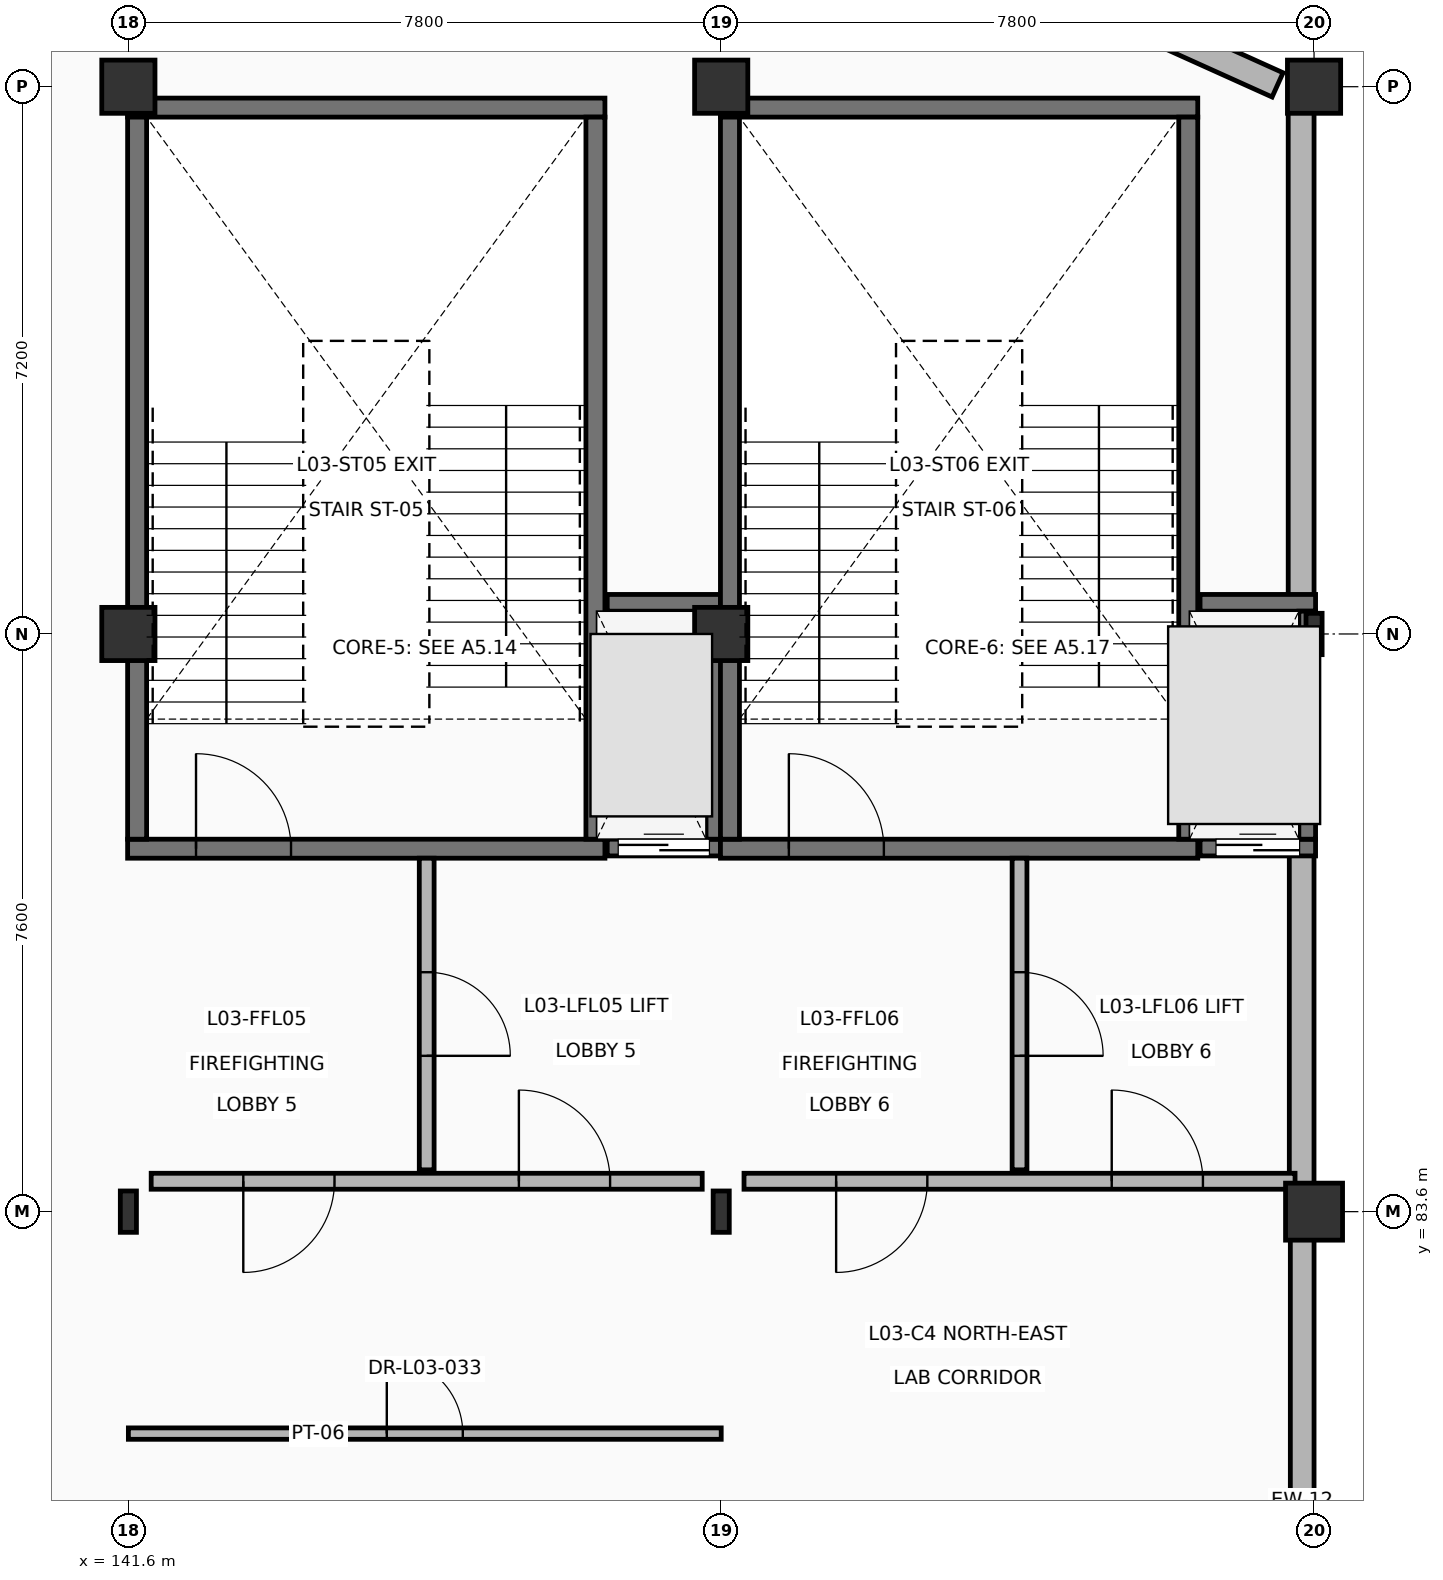
"""IFC4 building model, lengths in metres.
Left out: names, types, materials, properties, quantities, classifications, styles, units other than length and angle.
Written with IfcOpenShell. Run it as: python <this file> out.ifc"""

import sys

from ifc_helpers import new_model, si_unit, direction, frame, frame_2d, origin, origin_2d, place, context, subcontext, project, spatial, rectangle, circle, i_section, extrude, element, fill, save


model = new_model("IFC4")
c1 = context("Model", 3, precision=1e-05, world=origin(), true_north=direction((0.0, 1.0)))
c2 = subcontext(c1, "Body", "Model", "MODEL_VIEW")
j1 = project(units=[si_unit("LENGTHUNIT", "METRE"), si_unit("PLANEANGLEUNIT", "RADIAN")], contexts=[c1])
p1 = place(None, origin())
s1 = spatial("IfcSite", under=j1, at=p1, CompositionType="ELEMENT")
p2 = place(p1, origin())
s2 = spatial("IfcBuilding", under=s1, at=p2, CompositionType="ELEMENT")
p3 = place(p2, frame((0.0, 0.0, 10.5)))
s3 = spatial("IfcBuildingStorey", under=s2, at=p3, CompositionType="ELEMENT", Elevation=10.5)
p4 = place(p3, frame((141.6, 83.6, 0.0), z_axis=(0.0, 0.0, 1.0), x_axis=(1.0, 0.0, 0.0)))
e1 = element("IfcColumn", 1, at=p4, inside=s3, PredefinedType="COLUMN", context=c2, shape_type="SweptSolid", body=[
    extrude(i_section(OverallWidth=0.212, OverallDepth=0.544, WebThickness=0.013, FlangeThickness=0.021, at=origin_2d()), origin(), (0.0, 0.0, 1.0), 4.8),
])
for number, where, z_axis, x_axis in (
    (2, (141.6, 91.2, 0.0), (0.0, 0.0, 1.0), (1.0, 0.0, 0.0)),
    (3, (141.6, 98.4, 0.0), (0.0, 0.0, 1.0), (1.0, 0.0, 0.0)),
):
    element("IfcColumn", number, at=place(p3, frame(where, z_axis=z_axis, x_axis=x_axis)), inside=s3, PredefinedType="COLUMN", context=c2, shape_type="SweptSolid", body=[
        extrude(rectangle(XDim=0.7, YDim=0.7, at=origin_2d()), origin(), (0.0, 0.0, 1.0), 4.8),
    ])
p5 = place(p3, frame((149.4, 83.6, 0.0), z_axis=(0.0, 0.0, 1.0), x_axis=(1.0, 0.0, 0.0)))
e4 = element("IfcColumn", 4, at=p5, inside=s3, PredefinedType="COLUMN", context=c2, shape_type="SweptSolid", body=[
    extrude(i_section(OverallWidth=0.212, OverallDepth=0.544, WebThickness=0.013, FlangeThickness=0.021, at=origin_2d()), origin(), (0.0, 0.0, 1.0), 4.8),
])
for number, where, z_axis, x_axis in (
    (5, (149.4, 91.2, 0.0), (0.0, 0.0, 1.0), (1.0, 0.0, 0.0)),
    (6, (149.4, 98.4, 0.0), (0.0, 0.0, 1.0), (1.0, 0.0, 0.0)),
):
    element("IfcColumn", number, at=place(p3, frame(where, z_axis=z_axis, x_axis=x_axis)), inside=s3, PredefinedType="COLUMN", context=c2, shape_type="SweptSolid", body=[
        extrude(rectangle(XDim=0.7, YDim=0.7, at=origin_2d()), origin(), (0.0, 0.0, 1.0), 4.8),
    ])
p6 = place(p3, frame((157.2, 83.6, 0.0), z_axis=(0.0, 0.0, 1.0), x_axis=(1.0, 0.0, 0.0)))
e7 = element("IfcColumn", 7, at=p6, inside=s3, PredefinedType="COLUMN", context=c2, shape_type="SweptSolid", body=[
    extrude(circle(Radius=0.375, at=origin_2d()), origin(), (0.0, 0.0, 1.0), 4.8),
])
p7 = place(p3, frame((157.2, 91.2, 0.0), z_axis=(0.0, 0.0, 1.0), x_axis=(1.0, 0.0, 0.0)))
e8 = element("IfcColumn", 8, at=p7, inside=s3, PredefinedType="COLUMN", context=c2, shape_type="SweptSolid", body=[
    extrude(i_section(OverallWidth=0.212, OverallDepth=0.544, WebThickness=0.013, FlangeThickness=0.021, at=origin_2d()), origin(), (0.0, 0.0, 1.0), 4.8),
])
p8 = place(p3, frame((157.2, 98.4, 0.0), z_axis=(0.0, 0.0, 1.0), x_axis=(1.0, 0.0, 0.0)))
e9 = element("IfcColumn", 9, at=p8, inside=s3, PredefinedType="COLUMN", context=c2, shape_type="SweptSolid", body=[
    extrude(rectangle(XDim=0.7, YDim=0.7, at=origin_2d()), origin(), (0.0, 0.0, 1.0), 4.8),
])
p9 = place(p3, frame((157.03, 98.065, 0.0), z_axis=(0.0, 0.0, 1.0), x_axis=(0.0, -1.0, 0.0)))
e10 = element("IfcWall", 10, at=p9, inside=s3, PredefinedType="SOLIDWALL", context=c2, shape_type="SweptSolid", body=[
    extrude(rectangle(XDim=6.385, YDim=0.34, at=frame_2d((3.192, 0.0))), origin(), (0.0, 0.0, 1.0), 3.991),
])
p10 = place(p3, frame((157.037, 88.32, 0.0), z_axis=(0.0, 0.0, 1.0), x_axis=(0.0, -1.0, 0.0)))
e11 = element("IfcWall", 11, at=p10, inside=s3, PredefinedType="SOLIDWALL", context=c2, shape_type="SweptSolid", body=[
    extrude(rectangle(XDim=4.36, YDim=0.325, at=frame_2d((2.18, 0.0))), origin(), (0.0, 0.0, 1.0), 3.991),
])
p11 = place(p3, frame((157.044, 83.24, 0.0), z_axis=(0.0, 0.0, 1.0), x_axis=(0.0, -1.0, 0.0)))
e12 = element("IfcWall", 12, at=p11, inside=s3, PredefinedType="SOLIDWALL", context=c2, shape_type="SweptSolid", body=[
    extrude(rectangle(XDim=6.905, YDim=0.312, at=frame_2d((3.453, 0.0))), origin(), (0.0, 0.0, 1.0), 3.991),
])
p12 = place(p3, frame((150.046, 101.433, 0.0), z_axis=(0.0, 0.0, 1.0), x_axis=(0.911629880324, -0.411012118191, 0.0)))
e13 = element("IfcWall", 13, at=p12, inside=s3, PredefinedType="SOLIDWALL", context=c2, shape_type="SweptSolid", body=[
    extrude(rectangle(XDim=7.321, YDim=0.35, at=frame_2d((3.661, 0.0))), origin(), (0.0, 0.0, 1.0), 4.56),
])
p13 = place(p3, frame((141.59, 88.375, 0.0), z_axis=(0.0, 0.0, 1.0), x_axis=(1.0, 0.0, 0.0)))
e14 = element("IfcWall", 14, at=p13, inside=s3, PredefinedType="SHEAR", context=c2, shape_type="SweptSolid", body=[
    extrude(rectangle(XDim=6.28, YDim=0.25, at=frame_2d((3.14, 0.0))), origin(), (0.0, 0.0, 1.0), 4.54),
])
p14 = place(p13, frame((0.9, 0.0, 0.0)))
e15 = element("IfcOpeningElement", 15, at=p14, cuts=e14, PredefinedType="OPENING", context=c2, shape_type="SweptSolid", body=[
    extrude(rectangle(XDim=1.25, YDim=2.2, at=frame_2d((0.625, 1.1))), frame((0.0, 0.135, 0.0), z_axis=(0.0, -1.0, 0.0), x_axis=(1.0, 0.0, 0.0)), (0.0, 0.0, 1.0), 0.27),
])
p15 = place(p3, frame((141.59, 98.125, 0.0), z_axis=(0.0, 0.0, 1.0), x_axis=(1.0, 0.0, 0.0)))
e16 = element("IfcWall", 16, at=p15, inside=s3, PredefinedType="SHEAR", context=c2, shape_type="SweptSolid", body=[
    extrude(rectangle(XDim=6.28, YDim=0.25, at=frame_2d((3.14, 0.0))), origin(), (0.0, 0.0, 1.0), 4.54),
])
for number, where, z_axis, x_axis in (
    (17, (141.715, 88.5, 0.0), (0.0, 0.0, 1.0), (0.0, 1.0, 0.0)),
    (18, (147.745, 88.5, 0.0), (0.0, 0.0, 1.0), (0.0, 1.0, 0.0)),
):
    element("IfcWall", number, at=place(p3, frame(where, z_axis=z_axis, x_axis=x_axis)), inside=s3, PredefinedType="SHEAR", context=c2, shape_type="SweptSolid", body=[
        extrude(rectangle(XDim=9.5, YDim=0.25, at=frame_2d((4.75, 0.0))), origin(), (0.0, 0.0, 1.0), 4.54),
    ])
p16 = place(p3, frame((147.9, 88.39, 0.0), z_axis=(0.0, 0.0, 1.0), x_axis=(1.0, 0.0, 0.0)))
e19 = element("IfcWall", 19, at=p16, inside=s3, PredefinedType="SHEAR", context=c2, shape_type="SweptSolid", body=[
    extrude(rectangle(XDim=1.49, YDim=0.22, at=frame_2d((0.745, 0.0))), origin(), (0.0, 0.0, 1.0), 4.54),
])
p17 = place(p16, frame((0.145, 0.0, 0.0)))
e20 = element("IfcOpeningElement", 20, at=p17, cuts=e19, PredefinedType="OPENING", context=c2, shape_type="SweptSolid", body=[
    extrude(rectangle(XDim=1.2, YDim=2.2, at=frame_2d((0.6, 1.1))), frame((0.0, 0.12, 0.0), z_axis=(0.0, -1.0, 0.0), x_axis=(1.0, 0.0, 0.0)), (0.0, 0.0, 1.0), 0.24),
])
p18 = place(p3, frame((147.9, 91.61, 0.0), z_axis=(0.0, 0.0, 1.0), x_axis=(1.0, 0.0, 0.0)))
e21 = element("IfcWall", 21, at=p18, inside=s3, PredefinedType="SHEAR", context=c2, shape_type="SweptSolid", body=[
    extrude(rectangle(XDim=1.49, YDim=0.22, at=frame_2d((0.745, 0.0))), origin(), (0.0, 0.0, 1.0), 4.54),
])
p19 = place(p3, frame((149.31, 88.5, 0.0), z_axis=(0.0, 0.0, 1.0), x_axis=(0.0, 1.0, 0.0)))
e22 = element("IfcWall", 22, at=p19, inside=s3, PredefinedType="SHEAR", context=c2, shape_type="SweptSolid", body=[
    extrude(rectangle(XDim=3.0, YDim=0.22, at=frame_2d((1.5, 0.0))), origin(), (0.0, 0.0, 1.0), 4.54),
])
p20 = place(p3, frame((141.9, 84.0, 0.0), z_axis=(0.0, 0.0, 1.0), x_axis=(1.0, 0.0, 0.0)))
e23 = element("IfcWall", 23, at=p20, inside=s3, PredefinedType="PARTITIONING", context=c2, shape_type="SweptSolid", body=[
    extrude(rectangle(XDim=7.25, YDim=0.21, at=frame_2d((3.625, 0.0))), origin(), (0.0, 0.0, 1.0), 4.54),
])
p21 = place(p20, frame((1.212, 0.0, 0.0)))
e24 = element("IfcOpeningElement", 24, at=p21, cuts=e23, PredefinedType="OPENING", context=c2, shape_type="SweptSolid", body=[
    extrude(rectangle(XDim=1.2, YDim=2.2, at=frame_2d((0.6, 1.1))), frame((0.0, 0.115, 0.0), z_axis=(0.0, -1.0, 0.0), x_axis=(1.0, 0.0, 0.0)), (0.0, 0.0, 1.0), 0.23),
])
p22 = place(p20, frame((4.838, 0.0, 0.0)))
e25 = element("IfcOpeningElement", 25, at=p22, cuts=e23, PredefinedType="OPENING", context=c2, shape_type="SweptSolid", body=[
    extrude(rectangle(XDim=1.2, YDim=2.2, at=frame_2d((0.6, 1.1))), frame((0.0, 0.115, 0.0), z_axis=(0.0, -1.0, 0.0), x_axis=(1.0, 0.0, 0.0)), (0.0, 0.0, 1.0), 0.23),
])
p23 = place(p3, frame((145.525, 84.15, 0.0), z_axis=(0.0, 0.0, 1.0), x_axis=(0.0, 1.0, 0.0)))
e26 = element("IfcWall", 26, at=p23, inside=s3, PredefinedType="PARTITIONING", context=c2, shape_type="SweptSolid", body=[
    extrude(rectangle(XDim=4.1, YDim=0.195, at=frame_2d((2.05, 0.0))), origin(), (0.0, 0.0, 1.0), 4.54),
])
p24 = place(p23, frame((1.5, 0.0, 0.0)))
e27 = element("IfcOpeningElement", 27, at=p24, cuts=e26, PredefinedType="OPENING", context=c2, shape_type="SweptSolid", body=[
    extrude(rectangle(XDim=1.1, YDim=2.15, at=frame_2d((0.55, 1.075))), frame((0.0, 0.107, 0.0), z_axis=(0.0, -1.0, 0.0), x_axis=(1.0, 0.0, 0.0)), (0.0, 0.0, 1.0), 0.215),
])
p25 = place(p3, frame((149.39, 88.375, 0.0), z_axis=(0.0, 0.0, 1.0), x_axis=(1.0, 0.0, 0.0)))
e28 = element("IfcWall", 28, at=p25, inside=s3, PredefinedType="SHEAR", context=c2, shape_type="SweptSolid", body=[
    extrude(rectangle(XDim=6.28, YDim=0.25, at=frame_2d((3.14, 0.0))), origin(), (0.0, 0.0, 1.0), 4.54),
])
p26 = place(p25, frame((0.9, 0.0, 0.0)))
e29 = element("IfcOpeningElement", 29, at=p26, cuts=e28, PredefinedType="OPENING", context=c2, shape_type="SweptSolid", body=[
    extrude(rectangle(XDim=1.25, YDim=2.2, at=frame_2d((0.625, 1.1))), frame((0.0, 0.135, 0.0), z_axis=(0.0, -1.0, 0.0), x_axis=(1.0, 0.0, 0.0)), (0.0, 0.0, 1.0), 0.27),
])
p27 = place(p3, frame((149.39, 98.125, 0.0), z_axis=(0.0, 0.0, 1.0), x_axis=(1.0, 0.0, 0.0)))
e30 = element("IfcWall", 30, at=p27, inside=s3, PredefinedType="SHEAR", context=c2, shape_type="SweptSolid", body=[
    extrude(rectangle(XDim=6.28, YDim=0.25, at=frame_2d((3.14, 0.0))), origin(), (0.0, 0.0, 1.0), 4.54),
])
for number, where, z_axis, x_axis in (
    (31, (149.515, 88.5, 0.0), (0.0, 0.0, 1.0), (0.0, 1.0, 0.0)),
    (32, (155.545, 88.5, 0.0), (0.0, 0.0, 1.0), (0.0, 1.0, 0.0)),
):
    element("IfcWall", number, at=place(p3, frame(where, z_axis=z_axis, x_axis=x_axis)), inside=s3, PredefinedType="SHEAR", context=c2, shape_type="SweptSolid", body=[
        extrude(rectangle(XDim=9.5, YDim=0.25, at=frame_2d((4.75, 0.0))), origin(), (0.0, 0.0, 1.0), 4.54),
    ])
p28 = place(p3, frame((155.7, 88.39, 0.0), z_axis=(0.0, 0.0, 1.0), x_axis=(1.0, 0.0, 0.0)))
e33 = element("IfcWall", 33, at=p28, inside=s3, PredefinedType="SHEAR", context=c2, shape_type="SweptSolid", body=[
    extrude(rectangle(XDim=1.52, YDim=0.22, at=frame_2d((0.76, 0.0))), origin(), (0.0, 0.0, 1.0), 4.54),
])
p29 = place(p28, frame((0.21, 0.0, 0.0)))
e34 = element("IfcOpeningElement", 34, at=p29, cuts=e33, PredefinedType="OPENING", context=c2, shape_type="SweptSolid", body=[
    extrude(rectangle(XDim=1.1, YDim=2.15, at=frame_2d((0.55, 1.075))), frame((0.0, 0.12, 0.0), z_axis=(0.0, -1.0, 0.0), x_axis=(1.0, 0.0, 0.0)), (0.0, 0.0, 1.0), 0.24),
])
p30 = place(p3, frame((155.7, 91.61, 0.0), z_axis=(0.0, 0.0, 1.0), x_axis=(1.0, 0.0, 0.0)))
e35 = element("IfcWall", 35, at=p30, inside=s3, PredefinedType="SHEAR", context=c2, shape_type="SweptSolid", body=[
    extrude(rectangle(XDim=1.52, YDim=0.22, at=frame_2d((0.76, 0.0))), origin(), (0.0, 0.0, 1.0), 4.54),
])
p31 = place(p3, frame((157.11, 88.5, 0.0), z_axis=(0.0, 0.0, 1.0), x_axis=(0.0, 1.0, 0.0)))
e36 = element("IfcWall", 36, at=p31, inside=s3, PredefinedType="SHEAR", context=c2, shape_type="SweptSolid", body=[
    extrude(rectangle(XDim=3.0, YDim=0.22, at=frame_2d((1.5, 0.0))), origin(), (0.0, 0.0, 1.0), 4.54),
])
p32 = place(p3, frame((149.7, 84.0, 0.0), z_axis=(0.0, 0.0, 1.0), x_axis=(1.0, 0.0, 0.0)))
e37 = element("IfcWall", 37, at=p32, inside=s3, PredefinedType="PARTITIONING", context=c2, shape_type="SweptSolid", body=[
    extrude(rectangle(XDim=7.25, YDim=0.21, at=frame_2d((3.625, 0.0))), origin(), (0.0, 0.0, 1.0), 4.54),
])
p33 = place(p32, frame((1.212, 0.0, 0.0)))
e38 = element("IfcOpeningElement", 38, at=p33, cuts=e37, PredefinedType="OPENING", context=c2, shape_type="SweptSolid", body=[
    extrude(rectangle(XDim=1.2, YDim=2.2, at=frame_2d((0.6, 1.1))), frame((0.0, 0.115, 0.0), z_axis=(0.0, -1.0, 0.0), x_axis=(1.0, 0.0, 0.0)), (0.0, 0.0, 1.0), 0.23),
])
p34 = place(p32, frame((4.838, 0.0, 0.0)))
e39 = element("IfcOpeningElement", 39, at=p34, cuts=e37, PredefinedType="OPENING", context=c2, shape_type="SweptSolid", body=[
    extrude(rectangle(XDim=1.2, YDim=2.2, at=frame_2d((0.6, 1.1))), frame((0.0, 0.115, 0.0), z_axis=(0.0, -1.0, 0.0), x_axis=(1.0, 0.0, 0.0)), (0.0, 0.0, 1.0), 0.23),
])
p35 = place(p3, frame((153.325, 84.15, 0.0), z_axis=(0.0, 0.0, 1.0), x_axis=(0.0, 1.0, 0.0)))
e40 = element("IfcWall", 40, at=p35, inside=s3, PredefinedType="PARTITIONING", context=c2, shape_type="SweptSolid", body=[
    extrude(rectangle(XDim=4.1, YDim=0.195, at=frame_2d((2.05, 0.0))), origin(), (0.0, 0.0, 1.0), 4.54),
])
p36 = place(p35, frame((1.5, 0.0, 0.0)))
e41 = element("IfcOpeningElement", 41, at=p36, cuts=e40, PredefinedType="OPENING", context=c2, shape_type="SweptSolid", body=[
    extrude(rectangle(XDim=1.1, YDim=2.15, at=frame_2d((0.55, 1.075))), frame((0.0, 0.107, 0.0), z_axis=(0.0, -1.0, 0.0), x_axis=(1.0, 0.0, 0.0)), (0.0, 0.0, 1.0), 0.215),
])
p37 = place(p3, frame((141.6, 80.68, 0.0), z_axis=(0.0, 0.0, 1.0), x_axis=(1.0, 0.0, 0.0)))
e42 = element("IfcWall", 42, at=p37, inside=s3, PredefinedType="PARTITIONING", context=c2, shape_type="SweptSolid", body=[
    extrude(rectangle(XDim=7.8, YDim=0.15, at=frame_2d((3.9, 0.0))), origin(), (0.0, 0.0, 1.0), 3.991),
])
p38 = place(p37, frame((3.4, 0.0, 0.0)))
e43 = element("IfcOpeningElement", 43, at=p38, cuts=e42, PredefinedType="OPENING", context=c2, shape_type="SweptSolid", body=[
    extrude(rectangle(XDim=1.0, YDim=2.15, at=frame_2d((0.5, 1.075))), frame((0.0, 0.085, 0.0), z_axis=(0.0, -1.0, 0.0), x_axis=(1.0, 0.0, 0.0)), (0.0, 0.0, 1.0), 0.17),
])
p39 = place(p14, origin())
e44 = element("IfcDoor", 44, at=p39, inside=s3, OperationType="SINGLE_SWING_LEFT", PredefinedType="DOOR", context=c2, shape_type="SweptSolid", body=[
    extrude(rectangle(XDim=1.25, YDim=2.2, at=frame_2d((0.625, 1.1))), frame((0.0, 0.025, 0.0), z_axis=(0.0, -1.0, 0.0), x_axis=(1.0, 0.0, 0.0)), (0.0, 0.0, 1.0), 0.05),
])
fill(e15, e44)
p40 = place(p17, origin())
e45 = element("IfcDoor", 45, at=p40, inside=s3, OperationType="DOUBLE_DOOR_SLIDING", PredefinedType="DOOR", context=c2, shape_type="SweptSolid", body=[
    extrude(rectangle(XDim=1.2, YDim=2.2, at=frame_2d((0.6, 1.1))), frame((0.0, 0.025, 0.0), z_axis=(0.0, -1.0, 0.0), x_axis=(1.0, 0.0, 0.0)), (0.0, 0.0, 1.0), 0.05),
])
fill(e20, e45)
p41 = place(p21, origin())
e46 = element("IfcDoor", 46, at=p41, inside=s3, OperationType="SINGLE_SWING_RIGHT", PredefinedType="DOOR", context=c2, shape_type="SweptSolid", body=[
    extrude(rectangle(XDim=1.2, YDim=2.2, at=frame_2d((0.6, 1.1))), frame((0.0, 0.025, 0.0), z_axis=(0.0, -1.0, 0.0), x_axis=(1.0, 0.0, 0.0)), (0.0, 0.0, 1.0), 0.05),
])
fill(e24, e46)
p42 = place(p22, origin())
e47 = element("IfcDoor", 47, at=p42, inside=s3, OperationType="SINGLE_SWING_LEFT", PredefinedType="DOOR", context=c2, shape_type="SweptSolid", body=[
    extrude(rectangle(XDim=1.2, YDim=2.2, at=frame_2d((0.6, 1.1))), frame((0.0, 0.025, 0.0), z_axis=(0.0, -1.0, 0.0), x_axis=(1.0, 0.0, 0.0)), (0.0, 0.0, 1.0), 0.05),
])
fill(e25, e47)
p43 = place(p24, origin())
e48 = element("IfcDoor", 48, at=p43, inside=s3, OperationType="SINGLE_SWING_RIGHT", PredefinedType="DOOR", context=c2, shape_type="SweptSolid", body=[
    extrude(rectangle(XDim=1.1, YDim=2.15, at=frame_2d((0.55, 1.075))), frame((0.0, 0.025, 0.0), z_axis=(0.0, -1.0, 0.0), x_axis=(1.0, 0.0, 0.0)), (0.0, 0.0, 1.0), 0.05),
])
fill(e27, e48)
p44 = place(p26, origin())
e49 = element("IfcDoor", 49, at=p44, inside=s3, OperationType="SINGLE_SWING_LEFT", PredefinedType="DOOR", context=c2, shape_type="SweptSolid", body=[
    extrude(rectangle(XDim=1.25, YDim=2.2, at=frame_2d((0.625, 1.1))), frame((0.0, 0.025, 0.0), z_axis=(0.0, -1.0, 0.0), x_axis=(1.0, 0.0, 0.0)), (0.0, 0.0, 1.0), 0.05),
])
fill(e29, e49)
p45 = place(p29, origin())
e50 = element("IfcDoor", 50, at=p45, inside=s3, OperationType="DOUBLE_DOOR_SLIDING", PredefinedType="DOOR", context=c2, shape_type="SweptSolid", body=[
    extrude(rectangle(XDim=1.1, YDim=2.15, at=frame_2d((0.55, 1.075))), frame((0.0, 0.025, 0.0), z_axis=(0.0, -1.0, 0.0), x_axis=(1.0, 0.0, 0.0)), (0.0, 0.0, 1.0), 0.05),
])
fill(e34, e50)
p46 = place(p33, origin())
e51 = element("IfcDoor", 51, at=p46, inside=s3, OperationType="SINGLE_SWING_RIGHT", PredefinedType="DOOR", context=c2, shape_type="SweptSolid", body=[
    extrude(rectangle(XDim=1.2, YDim=2.2, at=frame_2d((0.6, 1.1))), frame((0.0, 0.025, 0.0), z_axis=(0.0, -1.0, 0.0), x_axis=(1.0, 0.0, 0.0)), (0.0, 0.0, 1.0), 0.05),
])
fill(e38, e51)
p47 = place(p34, origin())
e52 = element("IfcDoor", 52, at=p47, inside=s3, OperationType="SINGLE_SWING_LEFT", PredefinedType="DOOR", context=c2, shape_type="SweptSolid", body=[
    extrude(rectangle(XDim=1.2, YDim=2.2, at=frame_2d((0.6, 1.1))), frame((0.0, 0.025, 0.0), z_axis=(0.0, -1.0, 0.0), x_axis=(1.0, 0.0, 0.0)), (0.0, 0.0, 1.0), 0.05),
])
fill(e39, e52)
p48 = place(p36, origin())
e53 = element("IfcDoor", 53, at=p48, inside=s3, OperationType="SINGLE_SWING_RIGHT", PredefinedType="DOOR", context=c2, shape_type="SweptSolid", body=[
    extrude(rectangle(XDim=1.1, YDim=2.15, at=frame_2d((0.55, 1.075))), frame((0.0, 0.025, 0.0), z_axis=(0.0, -1.0, 0.0), x_axis=(1.0, 0.0, 0.0)), (0.0, 0.0, 1.0), 0.05),
])
fill(e41, e53)
p49 = place(p38, origin())
e54 = element("IfcDoor", 54, at=p49, inside=s3, OperationType="SINGLE_SWING_LEFT", PredefinedType="DOOR", context=c2, shape_type="SweptSolid", body=[
    extrude(rectangle(XDim=1.0, YDim=2.15, at=frame_2d((0.5, 1.075))), frame((0.0, 0.025, 0.0), z_axis=(0.0, -1.0, 0.0), x_axis=(1.0, 0.0, 0.0)), (0.0, 0.0, 1.0), 0.05),
])
fill(e43, e54)
save(model, sys.argv[1])
